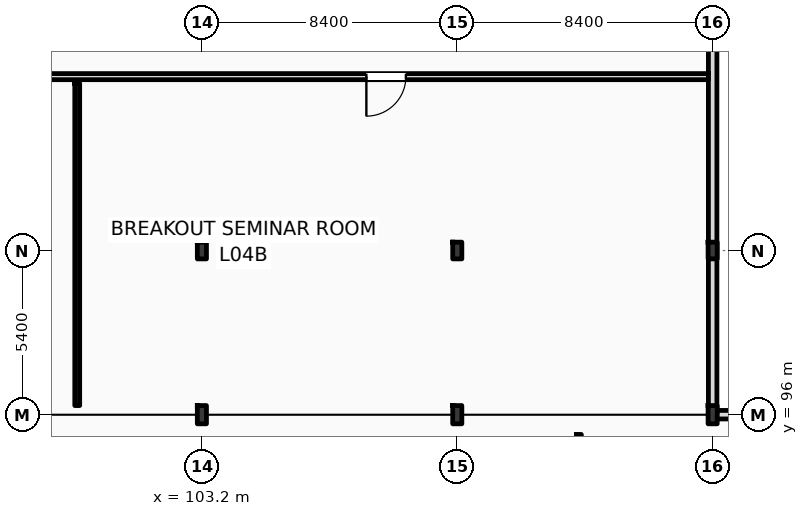
"""IFC4 building model, lengths in metres.
Left out: names, types, materials, properties, quantities, classifications, styles, units other than length and angle.
Written with IfcOpenShell. Run it as: python <this file> out.ifc"""

import sys

from ifc_helpers import new_model, si_unit, direction, frame, frame_2d, origin, origin_2d, place, context, subcontext, project, spatial, rectangle, i_section, extrude, element, fill, save


model = new_model("IFC4")
c1 = context("Model", 3, precision=1e-05, world=origin(), true_north=direction((0.0, 1.0)))
c2 = subcontext(c1, "Body", "Model", "MODEL_VIEW")
j1 = project(units=[si_unit("LENGTHUNIT", "METRE"), si_unit("PLANEANGLEUNIT", "RADIAN")], contexts=[c1])
p1 = place(None, origin())
s1 = spatial("IfcSite", under=j1, at=p1, CompositionType="ELEMENT")
p2 = place(p1, origin())
s2 = spatial("IfcBuilding", under=s1, at=p2, CompositionType="ELEMENT")
p3 = place(p2, frame((0.0, 0.0, 20.4)))
s3 = spatial("IfcBuildingStorey", under=s2, at=p3, CompositionType="ELEMENT", Elevation=20.4)
p4 = place(p3, frame((103.2, 96.0, 0.0), z_axis=(0.0, 0.0, 1.0), x_axis=(1.0, 0.0, 0.0)))
e1 = element("IfcColumn", 1, at=p4, inside=s3, PredefinedType="COLUMN", context=c2, shape_type="SweptSolid", body=[
    extrude(i_section(OverallWidth=0.3, OverallDepth=0.6, WebThickness=0.015, FlangeThickness=0.03, FilletRadius=0.027, at=origin_2d()), origin(), (0.0, 0.0, 1.0), 4.2),
])
p5 = place(p3, frame((103.2, 101.4, 0.0), z_axis=(0.0, 0.0, 1.0), x_axis=(1.0, 0.0, 0.0)))
e2 = element("IfcColumn", 2, at=p5, inside=s3, PredefinedType="COLUMN", context=c2, shape_type="SweptSolid", body=[
    extrude(i_section(OverallWidth=0.3, OverallDepth=0.55, WebThickness=0.015, FlangeThickness=0.029, FilletRadius=0.027, at=origin_2d()), origin(), (0.0, 0.0, 1.0), 4.2),
])
p6 = place(p3, frame((111.6, 96.0, 0.0), z_axis=(0.0, 0.0, 1.0), x_axis=(1.0, 0.0, 0.0)))
e3 = element("IfcColumn", 3, at=p6, inside=s3, PredefinedType="COLUMN", context=c2, shape_type="SweptSolid", body=[
    extrude(i_section(OverallWidth=0.3, OverallDepth=0.6, WebThickness=0.015, FlangeThickness=0.03, FilletRadius=0.027, at=origin_2d()), origin(), (0.0, 0.0, 1.0), 4.2),
])
p7 = place(p3, frame((111.6, 101.4, 0.0), z_axis=(0.0, 0.0, 1.0), x_axis=(1.0, 0.0, 0.0)))
e4 = element("IfcColumn", 4, at=p7, inside=s3, PredefinedType="COLUMN", context=c2, shape_type="SweptSolid", body=[
    extrude(i_section(OverallWidth=0.3, OverallDepth=0.55, WebThickness=0.015, FlangeThickness=0.029, FilletRadius=0.027, at=origin_2d()), origin(), (0.0, 0.0, 1.0), 4.2),
])
p8 = place(p3, frame((120.0, 96.0, 0.0), z_axis=(0.0, 0.0, 1.0), x_axis=(1.0, 0.0, 0.0)))
e5 = element("IfcColumn", 5, at=p8, inside=s3, PredefinedType="COLUMN", context=c2, shape_type="SweptSolid", body=[
    extrude(i_section(OverallWidth=0.3, OverallDepth=0.6, WebThickness=0.015, FlangeThickness=0.03, FilletRadius=0.027, at=origin_2d()), origin(), (0.0, 0.0, 1.0), 4.2),
])
p9 = place(p3, frame((120.0, 101.4, 0.0), z_axis=(0.0, 0.0, 1.0), x_axis=(1.0, 0.0, 0.0)))
e6 = element("IfcColumn", 6, at=p9, inside=s3, PredefinedType="COLUMN", context=c2, shape_type="SweptSolid", body=[
    extrude(i_section(OverallWidth=0.3, OverallDepth=0.55, WebThickness=0.015, FlangeThickness=0.029, FilletRadius=0.027, at=origin_2d()), origin(), (0.0, 0.0, 1.0), 4.2),
])
p10 = place(p3, frame((120.0, 96.0, 0.0), z_axis=(0.0, 0.0, 1.0), x_axis=(1.0, 0.0, 0.0)))
e7 = element("IfcWall", 7, at=p10, inside=s3, PredefinedType="STANDARD", context=c2, shape_type="SweptSolid", body=[
    extrude(rectangle(XDim=8.4, YDim=0.28, at=frame_2d((4.2, 0.0))), origin(), (0.0, 0.0, 1.0), 3.38),
])
p11 = place(p3, frame((120.0, 96.0, 0.0), z_axis=(0.0, 0.0, 1.0), x_axis=(0.0, 1.0, 0.0)))
e8 = element("IfcWall", 8, at=p11, inside=s3, PredefinedType="STANDARD", context=c2, shape_type="SweptSolid", body=[
    extrude(rectangle(XDim=22.0, YDim=0.28, at=frame_2d((11.0, 0.0))), origin(), (0.0, 0.0, 1.0), 3.53),
])
p12 = place(p3, frame((79.76, 107.12, 0.0), z_axis=(0.0, 0.0, 1.0), x_axis=(1.0, 0.0, 0.0)))
e9 = element("IfcWall", 9, at=p12, inside=s3, PredefinedType="PARTITIONING", context=c2, shape_type="SweptSolid", body=[
    extrude(rectangle(XDim=40.1, YDim=0.2, at=frame_2d((20.05, 0.0))), origin(), (0.0, 0.0, 1.0), 3.94),
])
p13 = place(p12, frame((9.35, 0.0, 0.0)))
e10 = element("IfcOpeningElement", 10, at=p13, cuts=e9, PredefinedType="OPENING", context=c2, shape_type="SweptSolid", body=[
    extrude(rectangle(XDim=1.3, YDim=2.2, at=frame_2d((0.65, 1.1))), frame((0.0, 0.11, 0.0), z_axis=(0.0, -1.0, 0.0), x_axis=(1.0, 0.0, 0.0)), (0.0, 0.0, 1.0), 0.22),
])
p14 = place(p12, frame((28.85, 0.0, 0.0)))
e11 = element("IfcOpeningElement", 11, at=p14, cuts=e9, PredefinedType="OPENING", context=c2, shape_type="SweptSolid", body=[
    extrude(rectangle(XDim=1.3, YDim=2.2, at=frame_2d((0.65, 1.1))), frame((0.0, 0.11, 0.0), z_axis=(0.0, -1.0, 0.0), x_axis=(1.0, 0.0, 0.0)), (0.0, 0.0, 1.0), 0.22),
])
p15 = place(p3, frame((99.1, 96.3, 0.0), z_axis=(0.0, 0.0, 1.0), x_axis=(0.0, 1.0, 0.0)))
e12 = element("IfcWall", 12, at=p15, inside=s3, PredefinedType="PARTITIONING", context=c2, shape_type="SweptSolid", body=[
    extrude(rectangle(XDim=10.6, YDim=0.16, at=frame_2d((5.3, 0.0))), origin(), (0.0, 0.0, 1.0), 3.94),
])
p16 = place(p3, frame((115.6, 78.45, 0.0), z_axis=(0.0, 0.0, 1.0), x_axis=(0.0, 1.0, 0.0)))
e13 = element("IfcWall", 13, at=p16, inside=s3, PredefinedType="PARTITIONING", context=c2, shape_type="SweptSolid", body=[
    extrude(rectangle(XDim=16.9, YDim=0.16, at=frame_2d((8.45, 0.0))), origin(), (0.0, 0.0, 1.0), 3.94),
])
p17 = place(p16, frame((7.8, 0.0, 0.0)))
e14 = element("IfcOpeningElement", 14, at=p17, cuts=e13, PredefinedType="OPENING", context=c2, shape_type="SweptSolid", body=[
    extrude(rectangle(XDim=1.3, YDim=2.2, at=frame_2d((0.65, 1.1))), frame((0.0, 0.09, 0.0), z_axis=(0.0, -1.0, 0.0), x_axis=(1.0, 0.0, 0.0)), (0.0, 0.0, 1.0), 0.18),
])
p18 = place(p14, frame((1.3, 0.0, 0.0), z_axis=(0.0, 0.0, 1.0), x_axis=(-1.0, 0.0, 0.0)))
e15 = element("IfcDoor", 15, at=p18, inside=s3, OperationType="SINGLE_SWING_LEFT", PredefinedType="DOOR", context=c2, shape_type="SweptSolid", body=[
    extrude(rectangle(XDim=1.3, YDim=2.2, at=frame_2d((0.65, 1.1))), frame((0.0, 0.025, 0.0), z_axis=(0.0, -1.0, 0.0), x_axis=(1.0, 0.0, 0.0)), (0.0, 0.0, 1.0), 0.05),
])
fill(e11, e15)
save(model, sys.argv[1])
